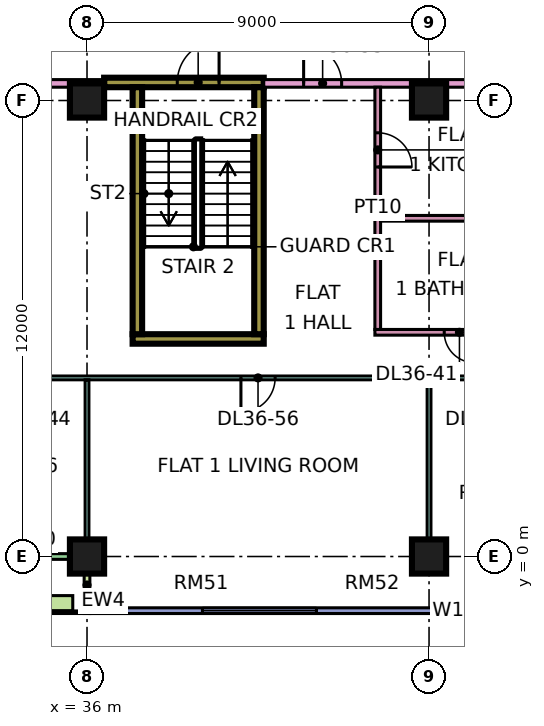
"""IFC4 building model, lengths in metres.
Left out: names, types, materials, properties, quantities, classifications, styles, units other than length and angle.
Written with IfcOpenShell. Run it as: python <this file> out.ifc"""

import sys

from ifc_helpers import new_model, si_unit, direction, frame, frame_2d, origin, origin_2d, place, context, subcontext, project, spatial, rectangle, extrude, element, fill, save


model = new_model("IFC4")
c1 = context("Model", 3, precision=1e-05, world=origin(), true_north=direction((0.0, 1.0)))
c2 = subcontext(c1, "Body", "Model", "MODEL_VIEW")
j1 = project(units=[si_unit("LENGTHUNIT", "METRE"), si_unit("PLANEANGLEUNIT", "RADIAN")], contexts=[c1])
p1 = place(None, origin())
s1 = spatial("IfcSite", under=j1, at=p1, CompositionType="ELEMENT")
p2 = place(p1, origin())
s2 = spatial("IfcBuilding", under=s1, at=p2, CompositionType="ELEMENT")
p3 = place(p2, frame((0.0, 0.0, 161.15)))
s3 = spatial("IfcBuildingStorey", under=s2, at=p3, CompositionType="ELEMENT", Elevation=161.15)
for number, where, z_axis, x_axis in (
    (1, (36.0, 0.0, 0.0), (0.0, 0.0, 1.0), (1.0, 0.0, 0.0)),
    (2, (36.0, 12.0, 0.0), (0.0, 0.0, 1.0), (1.0, 0.0, 0.0)),
    (3, (45.0, 0.0, 0.0), (0.0, 0.0, 1.0), (1.0, 0.0, 0.0)),
    (4, (45.0, 12.0, 0.0), (0.0, 0.0, 1.0), (1.0, 0.0, 0.0)),
):
    element("IfcColumn", number, at=place(p3, frame(where, z_axis=z_axis, x_axis=x_axis)), inside=s3, PredefinedType="COLUMN", context=c2, shape_type="SweptSolid", body=[
        extrude(rectangle(XDim=0.9, YDim=0.9, at=origin_2d()), origin(), (0.0, 0.0, 1.0), 3.75),
    ])
p4 = place(p3, frame((37.2, 5.725, 0.0), z_axis=(0.0, 0.0, 1.0), x_axis=(1.0, 0.0, 0.0)))
e5 = element("IfcWall", 5, at=p4, inside=s3, PredefinedType="SHEAR", context=c2, shape_type="SweptSolid", body=[
    extrude(rectangle(XDim=3.45, YDim=0.25, at=frame_2d((1.725, 0.0))), origin(), (0.0, 0.0, 1.0), 3.75),
])
p5 = place(p3, frame((36.45, 12.475, 0.0), z_axis=(0.0, 0.0, 1.0), x_axis=(1.0, 0.0, 0.0)))
e6 = element("IfcWall", 6, at=p5, inside=s3, PredefinedType="SHEAR", context=c2, shape_type="SweptSolid", body=[
    extrude(rectangle(XDim=4.2, YDim=0.25, at=frame_2d((2.1, 0.0))), origin(), (0.0, 0.0, 1.0), 3.75),
])
p6 = place(p5, frame((1.925, 0.0, 0.0)))
e7 = element("IfcOpeningElement", 7, at=p6, cuts=e6, PredefinedType="OPENING", context=c2, shape_type="SweptSolid", body=[
    extrude(rectangle(XDim=1.1, YDim=2.2, at=frame_2d((0.55, 1.1))), frame((0.0, 0.135, 0.0), z_axis=(0.0, -1.0, 0.0), x_axis=(1.0, 0.0, 0.0)), (0.0, 0.0, 1.0), 0.27),
])
for number, where, z_axis, x_axis in (
    (8, (37.325, 5.85, 0.0), (0.0, 0.0, 1.0), (0.0, 1.0, 0.0)),
    (9, (40.525, 5.85, 0.0), (0.0, 0.0, 1.0), (0.0, 1.0, 0.0)),
):
    element("IfcWall", number, at=place(p3, frame(where, z_axis=z_axis, x_axis=x_axis)), inside=s3, PredefinedType="SHEAR", context=c2, shape_type="SweptSolid", body=[
        extrude(rectangle(XDim=6.5, YDim=0.25, at=frame_2d((3.25, 0.0))), origin(), (0.0, 0.0, 1.0), 3.75),
    ])
p7 = place(p3, frame((24.075, 0.0, 0.0), z_axis=(0.0, 0.0, 1.0), x_axis=(1.0, 0.0, 0.0)))
e10 = element("IfcWall", 10, at=p7, inside=s3, PredefinedType="SOLIDWALL", context=c2, shape_type="SweptSolid", body=[
    extrude(rectangle(XDim=11.85, YDim=0.15, at=frame_2d((5.925, 0.0))), origin(), (0.0, 0.0, 1.0), 3.35),
])
p8 = place(p7, frame((2.3, 0.0, 0.0)))
e11 = element("IfcOpeningElement", 11, at=p8, cuts=e10, PredefinedType="OPENING", context=c2, shape_type="SweptSolid", body=[
    extrude(rectangle(XDim=1.8, YDim=2.4, at=frame_2d((0.9, 1.2))), frame((0.0, 0.085, 0.0), z_axis=(0.0, -1.0, 0.0), x_axis=(1.0, 0.0, 0.0)), (0.0, 0.0, 1.0), 0.17),
])
p9 = place(p7, frame((6.525, 0.0, 0.45)))
e12 = element("IfcOpeningElement", 12, at=p9, cuts=e10, PredefinedType="OPENING", context=c2, shape_type="SweptSolid", body=[
    extrude(rectangle(XDim=1.8, YDim=2.4, at=frame_2d((0.9, 1.2))), frame((0.0, 0.085, 0.0), z_axis=(0.0, -1.0, 0.0), x_axis=(1.0, 0.0, 0.0)), (0.0, 0.0, 1.0), 0.17),
])
p10 = place(p7, frame((9.55, 0.0, 0.45)))
e13 = element("IfcOpeningElement", 13, at=p10, cuts=e10, PredefinedType="OPENING", context=c2, shape_type="SweptSolid", body=[
    extrude(rectangle(XDim=1.2, YDim=2.4, at=frame_2d((0.6, 1.2))), frame((0.0, 0.085, 0.0), z_axis=(0.0, -1.0, 0.0), x_axis=(1.0, 0.0, 0.0)), (0.0, 0.0, 1.0), 0.17),
])
p11 = place(p3, frame((36.0, -1.5, 0.0), z_axis=(0.0, 0.0, 1.0), x_axis=(0.0, 1.0, 0.0)))
e14 = element("IfcWall", 14, at=p11, inside=s3, PredefinedType="SOLIDWALL", context=c2, shape_type="SweptSolid", body=[
    extrude(rectangle(XDim=1.5, YDim=0.15, at=frame_2d((0.75, 0.0))), origin(), (0.0, 0.0, 1.0), 3.35),
])
p12 = place(p3, frame((36.075, -1.425, 0.0), z_axis=(0.0, 0.0, 1.0), x_axis=(1.0, 0.0, 0.0)))
e15 = element("IfcWall", 15, at=p12, inside=s3, PredefinedType="SOLIDWALL", context=c2, shape_type="SweptSolid", body=[
    extrude(rectangle(XDim=11.85, YDim=0.15, at=frame_2d((5.925, 0.0))), origin(), (0.0, 0.0, 1.0), 3.35),
])
p13 = place(p12, frame((2.962, 0.0, 0.45)))
e16 = element("IfcOpeningElement", 16, at=p13, cuts=e15, PredefinedType="OPENING", context=c2, shape_type="SweptSolid", body=[
    extrude(rectangle(XDim=3.0, YDim=2.4, at=frame_2d((1.5, 1.2))), frame((0.0, 0.085, 0.0), z_axis=(0.0, -1.0, 0.0), x_axis=(1.0, 0.0, 0.0)), (0.0, 0.0, 1.0), 0.17),
])
p14 = place(p12, frame((9.488, 0.0, 0.45)))
e17 = element("IfcOpeningElement", 17, at=p14, cuts=e15, PredefinedType="OPENING", context=c2, shape_type="SweptSolid", body=[
    extrude(rectangle(XDim=1.8, YDim=2.4, at=frame_2d((0.9, 1.2))), frame((0.0, 0.085, 0.0), z_axis=(0.0, -1.0, 0.0), x_axis=(1.0, 0.0, 0.0)), (0.0, 0.0, 1.0), 0.17),
])
p15 = place(p3, frame((24.375, -1.229, 0.0), z_axis=(0.0, 0.0, 1.0), x_axis=(1.0, 0.0, 0.0)))
e18 = element("IfcWall", 18, at=p15, inside=s3, PredefinedType="SOLIDWALL", context=c2, shape_type="SweptSolid", body=[
    extrude(rectangle(XDim=11.25, YDim=0.4, at=frame_2d((5.625, 0.0))), origin(), (0.0, 0.0, 1.0), 0.7),
])
p16 = place(p3, frame((33.05, 4.7, 0.0), z_axis=(0.0, 0.0, 1.0), x_axis=(1.0, 0.0, 0.0)))
e19 = element("IfcWall", 19, at=p16, inside=s3, PredefinedType="PARTITIONING", context=c2, shape_type="SweptSolid", body=[
    extrude(rectangle(XDim=20.85, YDim=0.1, at=frame_2d((10.425, 0.0))), origin(), (0.0, 0.0, 1.0), 3.35),
])
p17 = place(p16, frame((1.0, 0.0, 0.0)))
e20 = element("IfcOpeningElement", 20, at=p17, cuts=e19, PredefinedType="OPENING", context=c2, shape_type="SweptSolid", body=[
    extrude(rectangle(XDim=0.9, YDim=2.1, at=frame_2d((0.45, 1.05))), frame((0.0, 0.06, 0.0), z_axis=(0.0, -1.0, 0.0), x_axis=(1.0, 0.0, 0.0)), (0.0, 0.0, 1.0), 0.12),
])
p18 = place(p16, frame((13.0, 0.0, 0.0)))
e21 = element("IfcOpeningElement", 21, at=p18, cuts=e19, PredefinedType="OPENING", context=c2, shape_type="SweptSolid", body=[
    extrude(rectangle(XDim=0.9, YDim=2.1, at=frame_2d((0.45, 1.05))), frame((0.0, 0.06, 0.0), z_axis=(0.0, -1.0, 0.0), x_axis=(1.0, 0.0, 0.0)), (0.0, 0.0, 1.0), 0.12),
])
p19 = place(p16, frame((16.0, 0.0, 0.0)))
e22 = element("IfcOpeningElement", 22, at=p19, cuts=e19, PredefinedType="OPENING", context=c2, shape_type="SweptSolid", body=[
    extrude(rectangle(XDim=0.9, YDim=2.1, at=frame_2d((0.45, 1.05))), frame((0.0, 0.06, 0.0), z_axis=(0.0, -1.0, 0.0), x_axis=(1.0, 0.0, 0.0)), (0.0, 0.0, 1.0), 0.12),
])
p20 = place(p16, frame((19.0, 0.0, 0.0)))
e23 = element("IfcOpeningElement", 23, at=p20, cuts=e19, PredefinedType="OPENING", context=c2, shape_type="SweptSolid", body=[
    extrude(rectangle(XDim=0.9, YDim=2.1, at=frame_2d((0.45, 1.05))), frame((0.0, 0.06, 0.0), z_axis=(0.0, -1.0, 0.0), x_axis=(1.0, 0.0, 0.0)), (0.0, 0.0, 1.0), 0.12),
])
p21 = place(p16, frame((7.0, 0.0, 0.0)))
e24 = element("IfcOpeningElement", 24, at=p21, cuts=e19, PredefinedType="OPENING", context=c2, shape_type="SweptSolid", body=[
    extrude(rectangle(XDim=0.9, YDim=2.1, at=frame_2d((0.45, 1.05))), frame((0.0, 0.06, 0.0), z_axis=(0.0, -1.0, 0.0), x_axis=(1.0, 0.0, 0.0)), (0.0, 0.0, 1.0), 0.12),
])
p22 = place(p3, frame((34.0, 12.45, 0.0), z_axis=(0.0, 0.0, 1.0), x_axis=(1.0, 0.0, 0.0)))
e25 = element("IfcWall", 25, at=p22, inside=s3, PredefinedType="PARTITIONING", context=c2, shape_type="SweptSolid", body=[
    extrude(rectangle(XDim=2.451, YDim=0.2, at=frame_2d((1.226, 0.0))), origin(), (0.0, 0.0, 1.0), 3.35),
])
p23 = place(p3, frame((36.0, 0.0, 0.0), z_axis=(0.0, 0.0, 1.0), x_axis=(0.0, 1.0, 0.0)))
e26 = element("IfcWall", 26, at=p23, inside=s3, PredefinedType="PARTITIONING", context=c2, shape_type="SweptSolid", body=[
    extrude(rectangle(XDim=4.65, YDim=0.1, at=frame_2d((2.325, 0.0))), origin(), (0.0, 0.0, 1.0), 3.35),
])
p24 = place(p3, frame((40.65, 12.45, 0.0), z_axis=(0.0, 0.0, 1.0), x_axis=(1.0, 0.0, 0.0)))
e27 = element("IfcWall", 27, at=p24, inside=s3, PredefinedType="PARTITIONING", context=c2, shape_type="SweptSolid", body=[
    extrude(rectangle(XDim=22.35, YDim=0.2, at=frame_2d((11.175, 0.0))), origin(), (0.0, 0.0, 1.0), 3.35),
])
p25 = place(p24, frame((20.1, 0.0, 0.0)))
e28 = element("IfcOpeningElement", 28, at=p25, cuts=e27, PredefinedType="OPENING", context=c2, shape_type="SweptSolid", body=[
    extrude(rectangle(XDim=1.0, YDim=2.1, at=frame_2d((0.5, 1.05))), frame((0.0, 0.11, 0.0), z_axis=(0.0, -1.0, 0.0), x_axis=(1.0, 0.0, 0.0)), (0.0, 0.0, 1.0), 0.22),
])
p26 = place(p24, frame((1.05, 0.0, 0.0)))
e29 = element("IfcOpeningElement", 29, at=p26, cuts=e27, PredefinedType="OPENING", context=c2, shape_type="SweptSolid", body=[
    extrude(rectangle(XDim=1.0, YDim=2.1, at=frame_2d((0.5, 1.05))), frame((0.0, 0.11, 0.0), z_axis=(0.0, -1.0, 0.0), x_axis=(1.0, 0.0, 0.0)), (0.0, 0.0, 1.0), 0.22),
])
p27 = place(p3, frame((43.575, 5.9, 0.0), z_axis=(0.0, 0.0, 1.0), x_axis=(1.0, 0.0, 0.0)))
e30 = element("IfcWall", 30, at=p27, inside=s3, PredefinedType="PARTITIONING", context=c2, shape_type="SweptSolid", body=[
    extrude(rectangle(XDim=10.325, YDim=0.15, at=frame_2d((5.163, 0.0))), origin(), (0.0, 0.0, 1.0), 3.35),
])
p28 = place(p27, frame((1.825, 0.0, 0.0)))
e31 = element("IfcOpeningElement", 31, at=p28, cuts=e30, PredefinedType="OPENING", context=c2, shape_type="SweptSolid", body=[
    extrude(rectangle(XDim=0.8, YDim=2.1, at=frame_2d((0.4, 1.05))), frame((0.0, 0.085, 0.0), z_axis=(0.0, -1.0, 0.0), x_axis=(1.0, 0.0, 0.0)), (0.0, 0.0, 1.0), 0.17),
])
p29 = place(p27, frame((6.975, 0.0, 0.0)))
e32 = element("IfcOpeningElement", 32, at=p29, cuts=e30, PredefinedType="OPENING", context=c2, shape_type="SweptSolid", body=[
    extrude(rectangle(XDim=0.9, YDim=2.1, at=frame_2d((0.45, 1.05))), frame((0.0, 0.085, 0.0), z_axis=(0.0, -1.0, 0.0), x_axis=(1.0, 0.0, 0.0)), (0.0, 0.0, 1.0), 0.17),
])
p30 = place(p3, frame((43.65, 5.975, 0.0), z_axis=(0.0, 0.0, 1.0), x_axis=(0.0, 1.0, 0.0)))
e33 = element("IfcWall", 33, at=p30, inside=s3, PredefinedType="PARTITIONING", context=c2, shape_type="SweptSolid", body=[
    extrude(rectangle(XDim=6.375, YDim=0.15, at=frame_2d((3.188, 0.0))), origin(), (0.0, 0.0, 1.0), 3.35),
])
p31 = place(p30, frame((4.275, 0.0, 0.0)))
e34 = element("IfcOpeningElement", 34, at=p31, cuts=e33, PredefinedType="OPENING", context=c2, shape_type="SweptSolid", body=[
    extrude(rectangle(XDim=0.9, YDim=2.1, at=frame_2d((0.45, 1.05))), frame((0.0, 0.085, 0.0), z_axis=(0.0, -1.0, 0.0), x_axis=(1.0, 0.0, 0.0)), (0.0, 0.0, 1.0), 0.17),
])
p32 = place(p3, frame((43.725, 8.9, 0.0), z_axis=(0.0, 0.0, 1.0), x_axis=(1.0, 0.0, 0.0)))
e35 = element("IfcWall", 35, at=p32, inside=s3, PredefinedType="PARTITIONING", context=c2, shape_type="SweptSolid", body=[
    extrude(rectangle(XDim=4.2, YDim=0.15, at=frame_2d((2.1, 0.0))), origin(), (0.0, 0.0, 1.0), 3.35),
])
p33 = place(p3, frame((45.0, 0.0, 0.0), z_axis=(0.0, 0.0, 1.0), x_axis=(0.0, 1.0, 0.0)))
e36 = element("IfcWall", 36, at=p33, inside=s3, PredefinedType="PARTITIONING", context=c2, shape_type="SweptSolid", body=[
    extrude(rectangle(XDim=4.65, YDim=0.1, at=frame_2d((2.325, 0.0))), origin(), (0.0, 0.0, 1.0), 3.35),
])
p34 = place(p13, origin())
e37 = element("IfcWindow", 37, at=p34, inside=s3, PartitioningType="SINGLE_PANEL", PredefinedType="WINDOW", context=c2, shape_type="SweptSolid", body=[
    extrude(rectangle(XDim=3.0, YDim=2.4, at=frame_2d((1.5, 1.2))), frame((0.0, 0.03, 0.0), z_axis=(0.0, -1.0, 0.0), x_axis=(1.0, 0.0, 0.0)), (0.0, 0.0, 1.0), 0.06),
])
fill(e16, e37)
p35 = place(p14, origin())
e38 = element("IfcWindow", 38, at=p35, inside=s3, PartitioningType="SINGLE_PANEL", PredefinedType="WINDOW", context=c2, shape_type="SweptSolid", body=[
    extrude(rectangle(XDim=1.8, YDim=2.4, at=frame_2d((0.9, 1.2))), frame((0.0, 0.03, 0.0), z_axis=(0.0, -1.0, 0.0), x_axis=(1.0, 0.0, 0.0)), (0.0, 0.0, 1.0), 0.06),
])
fill(e17, e38)
p36 = place(p6, frame((1.1, 0.0, 0.0), z_axis=(0.0, 0.0, 1.0), x_axis=(-1.0, 0.0, 0.0)))
e39 = element("IfcDoor", 39, at=p36, inside=s3, OperationType="SINGLE_SWING_RIGHT", PredefinedType="DOOR", context=c2, shape_type="SweptSolid", body=[
    extrude(rectangle(XDim=1.1, YDim=2.2, at=frame_2d((0.55, 1.1))), frame((0.0, 0.025, 0.0), z_axis=(0.0, -1.0, 0.0), x_axis=(1.0, 0.0, 0.0)), (0.0, 0.0, 1.0), 0.05),
])
fill(e7, e39)
p37 = place(p28, origin())
e40 = element("IfcDoor", 40, at=p37, inside=s3, OperationType="SINGLE_SWING_RIGHT", PredefinedType="DOOR", context=c2, shape_type="SweptSolid", body=[
    extrude(rectangle(XDim=0.8, YDim=2.1, at=frame_2d((0.4, 1.05))), frame((0.0, 0.025, 0.0), z_axis=(0.0, -1.0, 0.0), x_axis=(1.0, 0.0, 0.0)), (0.0, 0.0, 1.0), 0.05),
])
fill(e31, e40)
p38 = place(p26, origin())
e41 = element("IfcDoor", 41, at=p38, inside=s3, OperationType="SINGLE_SWING_LEFT", PredefinedType="DOOR", context=c2, shape_type="SweptSolid", body=[
    extrude(rectangle(XDim=1.0, YDim=2.1, at=frame_2d((0.5, 1.05))), frame((0.0, 0.025, 0.0), z_axis=(0.0, -1.0, 0.0), x_axis=(1.0, 0.0, 0.0)), (0.0, 0.0, 1.0), 0.05),
])
fill(e29, e41)
p39 = place(p31, frame((0.9, 0.0, 0.0), z_axis=(0.0, 0.0, 1.0), x_axis=(-1.0, 0.0, 0.0)))
e42 = element("IfcDoor", 42, at=p39, inside=s3, OperationType="SINGLE_SWING_LEFT", PredefinedType="DOOR", context=c2, shape_type="SweptSolid", body=[
    extrude(rectangle(XDim=0.9, YDim=2.1, at=frame_2d((0.45, 1.05))), frame((0.0, 0.025, 0.0), z_axis=(0.0, -1.0, 0.0), x_axis=(1.0, 0.0, 0.0)), (0.0, 0.0, 1.0), 0.05),
])
fill(e34, e42)
p40 = place(p21, frame((0.9, 0.0, 0.0), z_axis=(0.0, 0.0, 1.0), x_axis=(-1.0, 0.0, 0.0)))
e43 = element("IfcDoor", 43, at=p40, inside=s3, OperationType="SINGLE_SWING_LEFT", PredefinedType="DOOR", context=c2, shape_type="SweptSolid", body=[
    extrude(rectangle(XDim=0.9, YDim=2.1, at=frame_2d((0.45, 1.05))), frame((0.0, 0.025, 0.0), z_axis=(0.0, -1.0, 0.0), x_axis=(1.0, 0.0, 0.0)), (0.0, 0.0, 1.0), 0.05),
])
fill(e24, e43)
save(model, sys.argv[1])
